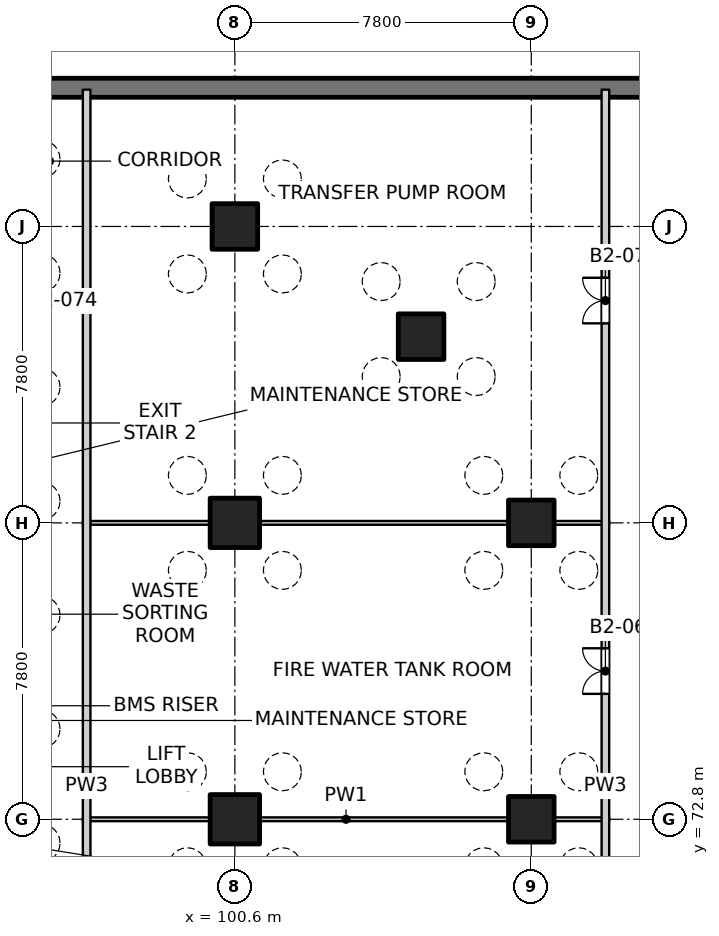
"""IFC4 building model, lengths in metres.
Left out: names, types, materials, properties, quantities, classifications, styles, units other than length and angle.
Written with IfcOpenShell. Run it as: python <this file> out.ifc"""

import sys

from ifc_helpers import new_model, si_unit, direction, frame, frame_2d, origin, origin_2d, place, context, subcontext, project, spatial, rectangle, extrude, element, fill, save


model = new_model("IFC4")
c1 = context("Model", 3, precision=1e-05, world=origin(), true_north=direction((0.0, 1.0)))
c2 = subcontext(c1, "Body", "Model", "MODEL_VIEW")
j1 = project(units=[si_unit("LENGTHUNIT", "METRE"), si_unit("PLANEANGLEUNIT", "RADIAN")], contexts=[c1])
p1 = place(None, origin())
s1 = spatial("IfcSite", under=j1, at=p1, CompositionType="ELEMENT")
p2 = place(p1, origin())
s2 = spatial("IfcBuilding", under=s1, at=p2, CompositionType="ELEMENT")
p3 = place(p2, frame((0.0, 0.0, -9.0)))
s3 = spatial("IfcBuildingStorey", under=s2, at=p3, CompositionType="ELEMENT", Elevation=-9.0)
p4 = place(p3, frame((42.6, 92.05, -0.5), z_axis=(0.0, 0.0, 1.0), x_axis=(1.0, 0.0, 0.0)))
e1 = element("IfcWall", 1, at=p4, inside=s3, PredefinedType="SOLIDWALL", context=c2, shape_type="SweptSolid", body=[
    extrude(rectangle(XDim=84.8, YDim=0.5, at=frame_2d((42.4, 0.0))), origin(), (0.0, 0.0, 1.0), 4.65),
])
for number, where, z_axis, x_axis in (
    (2, (105.5, 85.5, -0.5), (0.0, 0.0, 1.0), (1.0, 0.0, 0.0)),
    (3, (108.4, 72.8, -0.5), (0.0, 0.0, 1.0), (1.0, 0.0, 0.0)),
    (4, (108.4, 80.6, -0.5), (0.0, 0.0, 1.0), (1.0, 0.0, 0.0)),
    (5, (100.6, 88.4, -0.5), (0.0, 0.0, 1.0), (1.0, 0.0, 0.0)),
):
    element("IfcColumn", number, at=place(p3, frame(where, z_axis=z_axis, x_axis=x_axis)), inside=s3, PredefinedType="COLUMN", context=c2, shape_type="SweptSolid", body=[
        extrude(rectangle(XDim=1.2, YDim=1.2, at=origin_2d()), origin(), (0.0, 0.0, 1.0), 4.65),
    ])
for number, where, z_axis, x_axis in (
    (6, (100.6, 72.8, -0.5), (0.0, 0.0, 1.0), (1.0, 0.0, 0.0)),
    (7, (100.6, 80.6, -0.5), (0.0, 0.0, 1.0), (1.0, 0.0, 0.0)),
):
    element("IfcColumn", number, at=place(p3, frame(where, z_axis=z_axis, x_axis=x_axis)), inside=s3, PredefinedType="COLUMN", context=c2, shape_type="SweptSolid", body=[
        extrude(rectangle(XDim=1.3, YDim=1.3, at=origin_2d()), origin(), (0.0, 0.0, 1.0), 4.65),
    ])
for number, where, z_axis, x_axis in (
    (8, (96.6, 72.8, 0.0), (0.0, 0.0, 1.0), (1.0, 0.0, 0.0)),
    (9, (96.6, 80.6, 0.0), (0.0, 0.0, 1.0), (1.0, 0.0, 0.0)),
):
    element("IfcWall", number, at=place(p3, frame(where, z_axis=z_axis, x_axis=x_axis)), inside=s3, PredefinedType="PARTITIONING", context=c2, shape_type="SweptSolid", body=[
        extrude(rectangle(XDim=13.85, YDim=0.1, at=frame_2d((6.925, 0.0))), origin(), (0.0, 0.0, 1.0), 4.15),
    ])
p5 = place(p3, frame((96.7, 55.35, 0.0), z_axis=(0.0, 0.0, 1.0), x_axis=(0.0, 1.0, 0.0)))
e10 = element("IfcWall", 10, at=p5, inside=s3, PredefinedType="PARTITIONING", context=c2, shape_type="SweptSolid", body=[
    extrude(rectangle(XDim=36.65, YDim=0.2, at=frame_2d((18.325, 0.0))), origin(), (0.0, 0.0, 1.0), 4.15),
])
p6 = place(p3, frame((110.35, 55.35, 0.0), z_axis=(0.0, 0.0, 1.0), x_axis=(0.0, 1.0, 0.0)))
e11 = element("IfcWall", 11, at=p6, inside=s3, PredefinedType="PARTITIONING", context=c2, shape_type="SweptSolid", body=[
    extrude(rectangle(XDim=36.65, YDim=0.2, at=frame_2d((18.325, 0.0))), origin(), (0.0, 0.0, 1.0), 4.15),
])
p7 = place(p6, frame((3.2, 0.0, 0.0)))
e12 = element("IfcOpeningElement", 12, at=p7, cuts=e11, PredefinedType="OPENING", context=c2, shape_type="SweptSolid", body=[
    extrude(rectangle(XDim=1.2, YDim=2.1, at=frame_2d((0.6, 1.05))), frame((0.0, 0.11, 0.0), z_axis=(0.0, -1.0, 0.0), x_axis=(1.0, 0.0, 0.0)), (0.0, 0.0, 1.0), 0.22),
])
p8 = place(p6, frame((11.975, 0.0, 0.0)))
e13 = element("IfcOpeningElement", 13, at=p8, cuts=e11, PredefinedType="OPENING", context=c2, shape_type="SweptSolid", body=[
    extrude(rectangle(XDim=1.2, YDim=2.1, at=frame_2d((0.6, 1.05))), frame((0.0, 0.11, 0.0), z_axis=(0.0, -1.0, 0.0), x_axis=(1.0, 0.0, 0.0)), (0.0, 0.0, 1.0), 0.22),
])
p9 = place(p6, frame((20.75, 0.0, 0.0)))
e14 = element("IfcOpeningElement", 14, at=p9, cuts=e11, PredefinedType="OPENING", context=c2, shape_type="SweptSolid", body=[
    extrude(rectangle(XDim=1.2, YDim=2.1, at=frame_2d((0.6, 1.05))), frame((0.0, 0.11, 0.0), z_axis=(0.0, -1.0, 0.0), x_axis=(1.0, 0.0, 0.0)), (0.0, 0.0, 1.0), 0.22),
])
p10 = place(p6, frame((30.5, 0.0, 0.0)))
e15 = element("IfcOpeningElement", 15, at=p10, cuts=e11, PredefinedType="OPENING", context=c2, shape_type="SweptSolid", body=[
    extrude(rectangle(XDim=1.2, YDim=2.1, at=frame_2d((0.6, 1.05))), frame((0.0, 0.11, 0.0), z_axis=(0.0, -1.0, 0.0), x_axis=(1.0, 0.0, 0.0)), (0.0, 0.0, 1.0), 0.22),
])
p11 = place(p9, origin())
e16 = element("IfcDoor", 16, at=p11, inside=s3, OperationType="DOUBLE_DOOR_SINGLE_SWING", PredefinedType="DOOR", context=c2, shape_type="SweptSolid", body=[
    extrude(rectangle(XDim=1.2, YDim=2.1, at=frame_2d((0.6, 1.05))), frame((0.0, 0.025, 0.0), z_axis=(0.0, -1.0, 0.0), x_axis=(1.0, 0.0, 0.0)), (0.0, 0.0, 1.0), 0.05),
])
fill(e14, e16)
p12 = place(p10, origin())
e17 = element("IfcDoor", 17, at=p12, inside=s3, OperationType="DOUBLE_DOOR_SINGLE_SWING", PredefinedType="DOOR", context=c2, shape_type="SweptSolid", body=[
    extrude(rectangle(XDim=1.2, YDim=2.1, at=frame_2d((0.6, 1.05))), frame((0.0, 0.025, 0.0), z_axis=(0.0, -1.0, 0.0), x_axis=(1.0, 0.0, 0.0)), (0.0, 0.0, 1.0), 0.05),
])
fill(e15, e17)
save(model, sys.argv[1])
